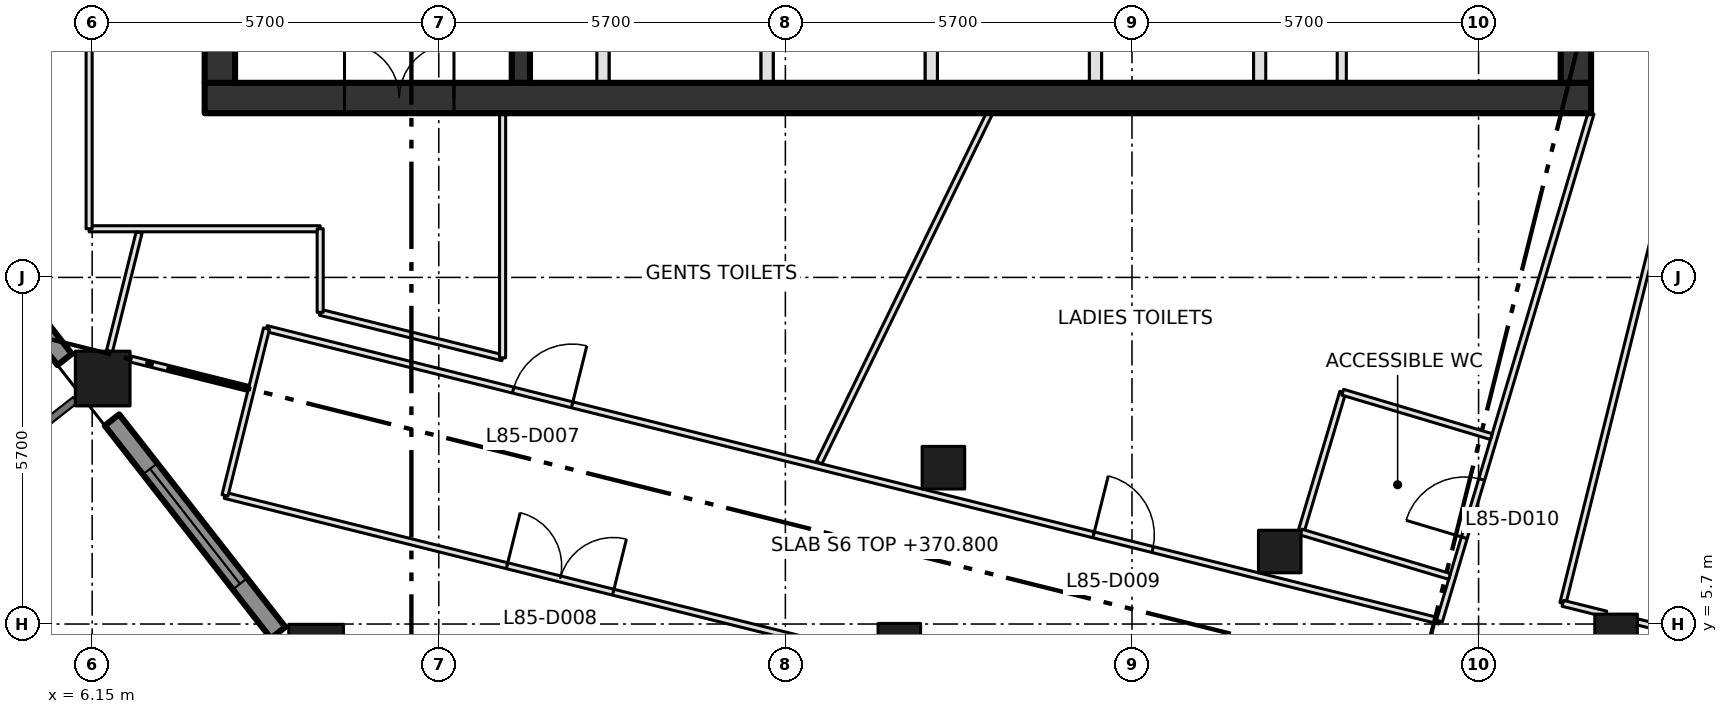
"""IFC4 building model, lengths in metres.
Left out: names, types, materials, properties, quantities, classifications, styles, units other than length and angle.
Written with IfcOpenShell. Run it as: python <this file> out.ifc"""

import sys

from ifc_helpers import new_model, si_unit, direction, frame, frame_2d, origin, origin_2d, place, context, subcontext, project, spatial, rectangle, extrude, element, fill, save


model = new_model("IFC4")
c1 = context("Model", 3, precision=1e-05, world=origin(), true_north=direction((0.0, 1.0)))
c2 = subcontext(c1, "Body", "Model", "MODEL_VIEW")
j1 = project(units=[si_unit("LENGTHUNIT", "METRE"), si_unit("PLANEANGLEUNIT", "RADIAN")], contexts=[c1])
p1 = place(None, origin())
s1 = spatial("IfcSite", under=j1, at=p1, CompositionType="ELEMENT")
p2 = place(p1, origin())
s2 = spatial("IfcBuilding", under=s1, at=p2, CompositionType="ELEMENT")
p3 = place(p2, frame((0.0, 0.0, 370.8)))
s3 = spatial("IfcBuildingStorey", under=s2, at=p3, CompositionType="ELEMENT", Elevation=370.8)
for number, where, z_axis, x_axis in (
    (1, (9.833, 5.245, 0.0), (0.0, 0.0, 1.0), (1.0, 0.0, 0.0)),
    (2, (6.323, 9.737, 0.0), (0.0, 0.0, 1.0), (1.0, 0.0, 0.0)),
):
    element("IfcColumn", number, at=place(p3, frame(where, z_axis=z_axis, x_axis=x_axis)), inside=s3, PredefinedType="COLUMN", context=c2, shape_type="SweptSolid", body=[
        extrude(rectangle(XDim=0.9, YDim=0.9, at=origin_2d()), origin(), (0.0, 0.0, 1.0), 4.2),
    ])
for number, where, z_axis, x_axis in (
    (3, (19.424, 5.36, 0.0), (0.0, 0.0, 1.0), (1.0, 0.0, 0.0)),
    (4, (20.149, 8.271, 0.0), (0.0, 0.0, 1.0), (1.0, 0.0, 0.0)),
    (5, (25.68, 6.892, 0.0), (0.0, 0.0, 1.0), (1.0, 0.0, 0.0)),
    (6, (31.211, 5.513, 0.0), (0.0, 0.0, 1.0), (1.0, 0.0, 0.0)),
):
    element("IfcColumn", number, at=place(p3, frame(where, z_axis=z_axis, x_axis=x_axis)), inside=s3, PredefinedType="COLUMN", context=c2, shape_type="SweptSolid", body=[
        extrude(rectangle(XDim=0.7, YDim=0.7, at=origin_2d()), origin(), (0.0, 0.0, 1.0), 4.2),
    ])
p4 = place(p3, frame((8.0, 14.35, -0.3), z_axis=(0.0, 0.0, 1.0), x_axis=(1.0, 0.0, 0.0)))
e7 = element("IfcWall", 7, at=p4, inside=s3, PredefinedType="SHEAR", context=c2, shape_type="SweptSolid", body=[
    extrude(rectangle(XDim=22.8, YDim=0.5, at=frame_2d((11.4, 0.0))), origin(), (0.0, 0.0, 1.0), 4.2),
])
p5 = place(p4, frame((2.3, 0.0, 0.3)))
e8 = element("IfcOpeningElement", 8, at=p5, cuts=e7, PredefinedType="OPENING", context=c2, shape_type="SweptSolid", body=[
    extrude(rectangle(XDim=1.8, YDim=2.1, at=frame_2d((0.9, 1.05))), frame((0.0, 0.26, 0.0), z_axis=(0.0, -1.0, 0.0), x_axis=(1.0, 0.0, 0.0)), (0.0, 0.0, 1.0), 0.52),
])
for number, where, z_axis, x_axis in (
    (9, (8.25, 14.6, -0.3), (0.0, 0.0, 1.0), (0.0, 1.0, 0.0)),
    (10, (30.55, 14.6, -0.3), (0.0, 0.0, 1.0), (0.0, 1.0, 0.0)),
):
    element("IfcWall", number, at=place(p3, frame(where, z_axis=z_axis, x_axis=x_axis)), inside=s3, PredefinedType="SHEAR", context=c2, shape_type="SweptSolid", body=[
        extrude(rectangle(XDim=21.1, YDim=0.5, at=frame_2d((10.55, 0.0))), origin(), (0.0, 0.0, 1.0), 4.2),
    ])
p6 = place(p3, frame((13.2, 14.6, 0.0), z_axis=(0.0, 0.0, 1.0), x_axis=(0.0, 1.0, 0.0)))
e11 = element("IfcWall", 11, at=p6, inside=s3, PredefinedType="SHEAR", context=c2, shape_type="SweptSolid", body=[
    extrude(rectangle(XDim=21.1, YDim=0.3, at=frame_2d((10.55, 0.0))), origin(), (0.0, 0.0, 1.0), 3.9),
])
p7 = place(p6, frame((3.7, 0.0, 0.0)))
e12 = element("IfcOpeningElement", 12, at=p7, cuts=e11, PredefinedType="OPENING", context=c2, shape_type="SweptSolid", body=[
    extrude(rectangle(XDim=1.8, YDim=2.1, at=frame_2d((0.9, 1.05))), frame((0.0, 0.16, 0.0), z_axis=(0.0, -1.0, 0.0), x_axis=(1.0, 0.0, 0.0)), (0.0, 0.0, 1.0), 0.32),
])
p8 = place(p6, frame((11.8, 0.0, 0.0)))
e13 = element("IfcOpeningElement", 13, at=p8, cuts=e11, PredefinedType="OPENING", context=c2, shape_type="SweptSolid", body=[
    extrude(rectangle(XDim=1.2, YDim=2.1, at=frame_2d((0.6, 1.05))), frame((0.0, 0.16, 0.0), z_axis=(0.0, -1.0, 0.0), x_axis=(1.0, 0.0, 0.0)), (0.0, 0.0, 1.0), 0.32),
])
for number, where, z_axis, x_axis in (
    (14, (14.55, 14.6, 0.0), (0.0, 0.0, 1.0), (0.0, 1.0, 0.0)),
    (15, (17.25, 14.6, 0.0), (0.0, 0.0, 1.0), (0.0, 1.0, 0.0)),
    (16, (19.95, 14.6, 0.0), (0.0, 0.0, 1.0), (0.0, 1.0, 0.0)),
    (17, (22.65, 14.6, 0.0), (0.0, 0.0, 1.0), (0.0, 1.0, 0.0)),
    (18, (25.35, 14.6, 0.0), (0.0, 0.0, 1.0), (0.0, 1.0, 0.0)),
):
    element("IfcWall", number, at=place(p3, frame(where, z_axis=z_axis, x_axis=x_axis)), inside=s3, PredefinedType="SOLIDWALL", context=c2, shape_type="SweptSolid", body=[
        extrude(rectangle(XDim=3.0, YDim=0.2, at=frame_2d((1.5, 0.0))), origin(), (0.0, 0.0, 1.0), 3.9),
    ])
p9 = place(p3, frame((26.7, 14.6, 0.0), z_axis=(0.0, 0.0, 1.0), x_axis=(0.0, 1.0, 0.0)))
e19 = element("IfcWall", 19, at=p9, inside=s3, PredefinedType="PARTITIONING", context=c2, shape_type="SweptSolid", body=[
    extrude(rectangle(XDim=3.0, YDim=0.15, at=frame_2d((1.5, 0.0))), origin(), (0.0, 0.0, 1.0), 3.9),
])
p10 = place(p3, frame((2.967, 13.547, 0.0), z_axis=(0.0, 0.0, 1.0), x_axis=(0.615486001463, -0.788147817356, 0.0)))
e20 = element("IfcWall", 20, at=p10, inside=s3, PredefinedType="SOLIDWALL", context=c2, shape_type="SweptSolid", body=[
    extrude(rectangle(XDim=4.437, YDim=0.3, at=frame_2d((2.219, 0.0))), origin(), (0.0, 0.0, 1.0), 3.2),
])
p11 = place(p10, frame((1.018, 0.0, 0.8)))
e21 = element("IfcOpeningElement", 21, at=p11, cuts=e20, PredefinedType="OPENING", context=c2, shape_type="SweptSolid", body=[
    extrude(rectangle(XDim=2.4, YDim=2.1, at=frame_2d((1.2, 1.05))), frame((0.0, 0.16, 0.0), z_axis=(0.0, -1.0, 0.0), x_axis=(1.0, 0.0, 0.0)), (0.0, 0.0, 1.0), 0.32),
])
p12 = place(p3, frame((6.476, 9.055, 0.0), z_axis=(0.0, 0.0, 1.0), x_axis=(0.615649380255, -0.788020203162, 0.0)))
e22 = element("IfcWall", 22, at=p12, inside=s3, PredefinedType="SOLIDWALL", context=c2, shape_type="SweptSolid", body=[
    extrude(rectangle(XDim=4.438, YDim=0.3, at=frame_2d((2.219, 0.0))), origin(), (0.0, 0.0, 1.0), 3.2),
])
p13 = place(p12, frame((1.019, 0.0, 0.8)))
e23 = element("IfcOpeningElement", 23, at=p13, cuts=e22, PredefinedType="OPENING", context=c2, shape_type="SweptSolid", body=[
    extrude(rectangle(XDim=2.4, YDim=2.1, at=frame_2d((1.2, 1.05))), frame((0.0, 0.16, 0.0), z_axis=(0.0, -1.0, 0.0), x_axis=(1.0, 0.0, 0.0)), (0.0, 0.0, 1.0), 0.32),
])
p14 = place(p3, frame((6.1, 12.2, 0.0), z_axis=(0.0, 0.0, 1.0), x_axis=(1.0, 0.0, 0.0)))
e24 = element("IfcWall", 24, at=p14, inside=s3, PredefinedType="PARTITIONING", context=c2, shape_type="SweptSolid", body=[
    extrude(rectangle(XDim=3.8, YDim=0.1, at=frame_2d((1.9, 0.0))), origin(), (0.0, 0.0, 1.0), 3.9),
])
p15 = place(p3, frame((6.1, 38.9, 0.0), z_axis=(0.0, 0.0, 1.0), x_axis=(0.0, -1.0, 0.0)))
e25 = element("IfcWall", 25, at=p15, inside=s3, PredefinedType="PARTITIONING", context=c2, shape_type="SweptSolid", body=[
    extrude(rectangle(XDim=26.7, YDim=0.1, at=frame_2d((13.35, 0.0))), origin(), (0.0, 0.0, 1.0), 3.9),
])
p16 = place(p15, frame((21.068, 0.0, 0.0)))
e26 = element("IfcOpeningElement", 26, at=p16, cuts=e25, PredefinedType="OPENING", context=c2, shape_type="SweptSolid", body=[
    extrude(rectangle(XDim=1.0, YDim=2.1, at=frame_2d((0.5, 1.05))), frame((0.0, 0.06, 0.0), z_axis=(0.0, -1.0, 0.0), x_axis=(1.0, 0.0, 0.0)), (0.0, 0.0, 1.0), 0.12),
])
p17 = place(p15, frame((10.568, 0.0, 0.0)))
e27 = element("IfcOpeningElement", 27, at=p17, cuts=e25, PredefinedType="OPENING", context=c2, shape_type="SweptSolid", body=[
    extrude(rectangle(XDim=1.0, YDim=2.1, at=frame_2d((0.5, 1.05))), frame((0.0, 0.06, 0.0), z_axis=(0.0, -1.0, 0.0), x_axis=(1.0, 0.0, 0.0)), (0.0, 0.0, 1.0), 0.12),
])
p18 = place(p3, frame((8.334, 7.815, 0.0), z_axis=(0.0, 0.0, 1.0), x_axis=(0.970312231044, -0.241855688968, 0.0)))
e28 = element("IfcWall", 28, at=p18, inside=s3, PredefinedType="PARTITIONING", context=c2, shape_type="SweptSolid", body=[
    extrude(rectangle(XDim=11.069, YDim=0.1, at=frame_2d((5.534, 0.0))), origin(), (0.0, 0.0, 1.0), 3.9),
])
p19 = place(p18, frame((4.78, 0.0, 0.0)))
e29 = element("IfcOpeningElement", 29, at=p19, cuts=e28, PredefinedType="OPENING", context=c2, shape_type="SweptSolid", body=[
    extrude(rectangle(XDim=1.8, YDim=2.1, at=frame_2d((0.9, 1.05))), frame((0.0, 0.06, 0.0), z_axis=(0.0, -1.0, 0.0), x_axis=(1.0, 0.0, 0.0)), (0.0, 0.0, 1.0), 0.12),
])
p20 = place(p3, frame((9.017, 10.558, 0.0), z_axis=(0.0, 0.0, 1.0), x_axis=(0.970297621765, -0.241914293082, 0.0)))
e30 = element("IfcWall", 30, at=p20, inside=s3, PredefinedType="PARTITIONING", context=c2, shape_type="SweptSolid", body=[
    extrude(rectangle(XDim=19.879, YDim=0.1, at=frame_2d((9.94, 0.0))), origin(), (0.0, 0.0, 1.0), 3.9),
])
p21 = place(p20, frame((4.18, 0.0, 0.0)))
e31 = element("IfcOpeningElement", 31, at=p21, cuts=e30, PredefinedType="OPENING", context=c2, shape_type="SweptSolid", body=[
    extrude(rectangle(XDim=1.0, YDim=2.1, at=frame_2d((0.5, 1.05))), frame((0.0, 0.06, 0.0), z_axis=(0.0, -1.0, 0.0), x_axis=(1.0, 0.0, 0.0)), (0.0, 0.0, 1.0), 0.12),
])
p22 = place(p20, frame((14.018, 0.0, 0.0)))
e32 = element("IfcOpeningElement", 32, at=p22, cuts=e30, PredefinedType="OPENING", context=c2, shape_type="SweptSolid", body=[
    extrude(rectangle(XDim=1.0, YDim=2.1, at=frame_2d((0.5, 1.05))), frame((0.0, 0.06, 0.0), z_axis=(0.0, -1.0, 0.0), x_axis=(1.0, 0.0, 0.0)), (0.0, 0.0, 1.0), 0.12),
])
p23 = place(p3, frame((9.017, 10.558, 0.0), z_axis=(0.0, 0.0, 1.0), x_axis=(-0.241641419317, -0.970365613813, 0.0)))
e33 = element("IfcWall", 33, at=p23, inside=s3, PredefinedType="PARTITIONING", context=c2, shape_type="SweptSolid", body=[
    extrude(rectangle(XDim=2.827, YDim=0.1, at=frame_2d((1.414, 0.0))), origin(), (0.0, 0.0, 1.0), 3.9),
])
p24 = place(p3, frame((9.9, 10.826, 0.0), z_axis=(0.0, 0.0, 1.0), x_axis=(0.970290953223, -0.241941038466, 0.0)))
e34 = element("IfcWall", 34, at=p24, inside=s3, PredefinedType="PARTITIONING", context=c2, shape_type="SweptSolid", body=[
    extrude(rectangle(XDim=3.092, YDim=0.1, at=frame_2d((1.546, 0.0))), origin(), (0.0, 0.0, 1.0), 3.9),
])
p25 = place(p3, frame((9.9, 12.2, 0.0), z_axis=(0.0, 0.0, 1.0), x_axis=(0.0, -1.0, 0.0)))
e35 = element("IfcWall", 35, at=p25, inside=s3, PredefinedType="PARTITIONING", context=c2, shape_type="SweptSolid", body=[
    extrude(rectangle(XDim=1.374, YDim=0.1, at=frame_2d((0.687, 0.0))), origin(), (0.0, 0.0, 1.0), 3.9),
])
p26 = place(p3, frame((12.9, 10.078, 0.0), z_axis=(0.0, 0.0, 1.0), x_axis=(0.0, 1.0, 0.0)))
e36 = element("IfcWall", 36, at=p26, inside=s3, PredefinedType="PARTITIONING", context=c2, shape_type="SweptSolid", body=[
    extrude(rectangle(XDim=4.022, YDim=0.1, at=frame_2d((2.011, 0.0))), origin(), (0.0, 0.0, 1.0), 3.9),
])
p27 = place(p3, frame((28.306, 5.749, 0.0), z_axis=(0.0, 0.0, 1.0), x_axis=(0.286170650389, 0.958178667502, 0.0)))
e37 = element("IfcWall", 37, at=p27, inside=s3, PredefinedType="PARTITIONING", context=c2, shape_type="SweptSolid", body=[
    extrude(rectangle(XDim=8.716, YDim=0.1, at=frame_2d((4.358, 0.0))), origin(), (0.0, 0.0, 1.0), 3.9),
])
p28 = place(p27, frame((1.43, 0.0, 0.0)))
e38 = element("IfcOpeningElement", 38, at=p28, cuts=e37, PredefinedType="OPENING", context=c2, shape_type="SweptSolid", body=[
    extrude(rectangle(XDim=1.0, YDim=2.1, at=frame_2d((0.5, 1.05))), frame((0.0, 0.06, 0.0), z_axis=(0.0, -1.0, 0.0), x_axis=(1.0, 0.0, 0.0)), (0.0, 0.0, 1.0), 0.12),
])
p29 = place(p3, frame((30.336, 6.04, 0.0), z_axis=(0.0, 0.0, 1.0), x_axis=(0.2420145387, 0.970272623059, 0.0)))
e39 = element("IfcWall", 39, at=p29, inside=s3, PredefinedType="PARTITIONING", context=c2, shape_type="SweptSolid", body=[
    extrude(rectangle(XDim=7.276, YDim=0.1, at=frame_2d((3.638, 0.0))), origin(), (0.0, 0.0, 1.0), 3.9),
])
p30 = place(p3, frame((31.046, 5.863, 0.0), z_axis=(0.0, 0.0, 1.0), x_axis=(-0.970299315901, 0.241907497946, 0.0)))
e40 = element("IfcWall", 40, at=p30, inside=s3, PredefinedType="PARTITIONING", context=c2, shape_type="SweptSolid", body=[
    extrude(rectangle(XDim=0.732, YDim=0.1, at=frame_2d((0.366, 0.0))), origin(), (0.0, 0.0, 1.0), 3.9),
])
p31 = place(p3, frame((31.561, 5.735, 0.0), z_axis=(0.0, 0.0, 1.0), x_axis=(0.970267382462, -0.242035548071, 0.0)))
e41 = element("IfcWall", 41, at=p31, inside=s3, PredefinedType="PARTITIONING", context=c2, shape_type="SweptSolid", body=[
    extrude(rectangle(XDim=5.17, YDim=0.1, at=frame_2d((2.585, 0.0))), origin(), (0.0, 0.0, 1.0), 3.9),
])
p32 = place(p31, frame((1.28, 0.0, 0.0)))
e42 = element("IfcOpeningElement", 42, at=p32, cuts=e41, PredefinedType="OPENING", context=c2, shape_type="SweptSolid", body=[
    extrude(rectangle(XDim=1.0, YDim=2.1, at=frame_2d((0.5, 1.05))), frame((0.0, 0.06, 0.0), z_axis=(0.0, -1.0, 0.0), x_axis=(1.0, 0.0, 0.0)), (0.0, 0.0, 1.0), 0.12),
])
p33 = place(p3, frame((6.922, 12.138, 0.0), z_axis=(0.0, 0.0, 1.0), x_axis=(-0.24222136375, -0.97022101139, 0.0)))
e43 = element("IfcWall", 43, at=p33, inside=s3, PredefinedType="PARTITIONING", context=c2, shape_type="SweptSolid", body=[
    extrude(rectangle(XDim=2.011, YDim=0.1, at=frame_2d((1.005, 0.0))), origin(), (0.0, 0.0, 1.0), 3.9),
])
p34 = place(p3, frame((8.72, 9.574, 0.0), z_axis=(0.0, 0.0, 1.0), x_axis=(-0.970221168815, 0.24222073318, 0.0)))
e44 = element("IfcWall", 44, at=p34, inside=s3, PredefinedType="PARTITIONING", context=c2, shape_type="SweptSolid", body=[
    extrude(rectangle(XDim=2.007, YDim=0.1, at=frame_2d((1.003, 0.0))), origin(), (0.0, 0.0, 1.0), 3.9),
])
p35 = place(p3, frame((18.105, 8.354, 0.0), z_axis=(0.0, 0.0, 1.0), x_axis=(0.438424384383, 0.898768078638, 0.0)))
e45 = element("IfcWall", 45, at=p35, inside=s3, PredefinedType="PARTITIONING", context=c2, shape_type="SweptSolid", body=[
    extrude(rectangle(XDim=6.393, YDim=0.1, at=frame_2d((3.197, 0.0))), origin(), (0.0, 0.0, 1.0), 3.9),
])
p36 = place(p3, frame((26.03, 7.214, 0.0), z_axis=(0.0, 0.0, 1.0), x_axis=(0.286077381682, 0.958206518288, 0.0)))
e46 = element("IfcWall", 46, at=p36, inside=s3, PredefinedType="PARTITIONING", context=c2, shape_type="SweptSolid", body=[
    extrude(rectangle(XDim=2.398, YDim=0.1, at=frame_2d((1.199, 0.0))), origin(), (0.0, 0.0, 1.0), 3.9),
])
p37 = place(p3, frame((26.716, 9.512, 0.0), z_axis=(0.0, 0.0, 1.0), x_axis=(0.958168093169, -0.286206053804, 0.0)))
e47 = element("IfcWall", 47, at=p37, inside=s3, PredefinedType="PARTITIONING", context=c2, shape_type="SweptSolid", body=[
    extrude(rectangle(XDim=2.551, YDim=0.1, at=frame_2d((1.275, 0.0))), origin(), (0.0, 0.0, 1.0), 3.9),
])
p38 = place(p3, frame((28.473, 6.482, 0.0), z_axis=(0.0, 0.0, 1.0), x_axis=(-0.958136712348, 0.286311090338, 0.0)))
e48 = element("IfcWall", 48, at=p38, inside=s3, PredefinedType="PARTITIONING", context=c2, shape_type="SweptSolid", body=[
    extrude(rectangle(XDim=2.55, YDim=0.1, at=frame_2d((1.275, 0.0))), origin(), (0.0, 0.0, 1.0), 3.9),
])
p39 = place(p5, origin())
e49 = element("IfcDoor", 49, at=p39, inside=s3, OperationType="DOUBLE_DOOR_SINGLE_SWING", PredefinedType="DOOR", context=c2, shape_type="SweptSolid", body=[
    extrude(rectangle(XDim=1.8, YDim=2.1, at=frame_2d((0.9, 1.05))), frame((0.0, 0.025, 0.0), z_axis=(0.0, -1.0, 0.0), x_axis=(1.0, 0.0, 0.0)), (0.0, 0.0, 1.0), 0.05),
])
fill(e8, e49)
p40 = place(p13, origin())
e50 = element("IfcWindow", 50, at=p40, inside=s3, PartitioningType="DOUBLE_PANEL_VERTICAL", PredefinedType="WINDOW", context=c2, shape_type="SweptSolid", body=[
    extrude(rectangle(XDim=2.4, YDim=2.1, at=frame_2d((1.2, 1.05))), frame((0.0, 0.03, 0.0), z_axis=(0.0, -1.0, 0.0), x_axis=(1.0, 0.0, 0.0)), (0.0, 0.0, 1.0), 0.06),
])
fill(e23, e50)
p41 = place(p21, origin())
e51 = element("IfcDoor", 51, at=p41, inside=s3, OperationType="SINGLE_SWING_RIGHT", PredefinedType="DOOR", context=c2, shape_type="SweptSolid", body=[
    extrude(rectangle(XDim=1.0, YDim=2.1, at=frame_2d((0.5, 1.05))), frame((0.0, 0.025, 0.0), z_axis=(0.0, -1.0, 0.0), x_axis=(1.0, 0.0, 0.0)), (0.0, 0.0, 1.0), 0.05),
])
fill(e31, e51)
p42 = place(p19, origin())
e52 = element("IfcDoor", 52, at=p42, inside=s3, OperationType="DOUBLE_DOOR_SINGLE_SWING", PredefinedType="DOOR", context=c2, shape_type="SweptSolid", body=[
    extrude(rectangle(XDim=1.8, YDim=2.1, at=frame_2d((0.9, 1.05))), frame((0.0, 0.025, 0.0), z_axis=(0.0, -1.0, 0.0), x_axis=(1.0, 0.0, 0.0)), (0.0, 0.0, 1.0), 0.05),
])
fill(e29, e52)
p43 = place(p22, origin())
e53 = element("IfcDoor", 53, at=p43, inside=s3, OperationType="SINGLE_SWING_LEFT", PredefinedType="DOOR", context=c2, shape_type="SweptSolid", body=[
    extrude(rectangle(XDim=1.0, YDim=2.1, at=frame_2d((0.5, 1.05))), frame((0.0, 0.025, 0.0), z_axis=(0.0, -1.0, 0.0), x_axis=(1.0, 0.0, 0.0)), (0.0, 0.0, 1.0), 0.05),
])
fill(e32, e53)
p44 = place(p28, origin())
e54 = element("IfcDoor", 54, at=p44, inside=s3, OperationType="SINGLE_SWING_LEFT", PredefinedType="DOOR", context=c2, shape_type="SweptSolid", body=[
    extrude(rectangle(XDim=1.0, YDim=2.1, at=frame_2d((0.5, 1.05))), frame((0.0, 0.025, 0.0), z_axis=(0.0, -1.0, 0.0), x_axis=(1.0, 0.0, 0.0)), (0.0, 0.0, 1.0), 0.05),
])
fill(e38, e54)
save(model, sys.argv[1])
